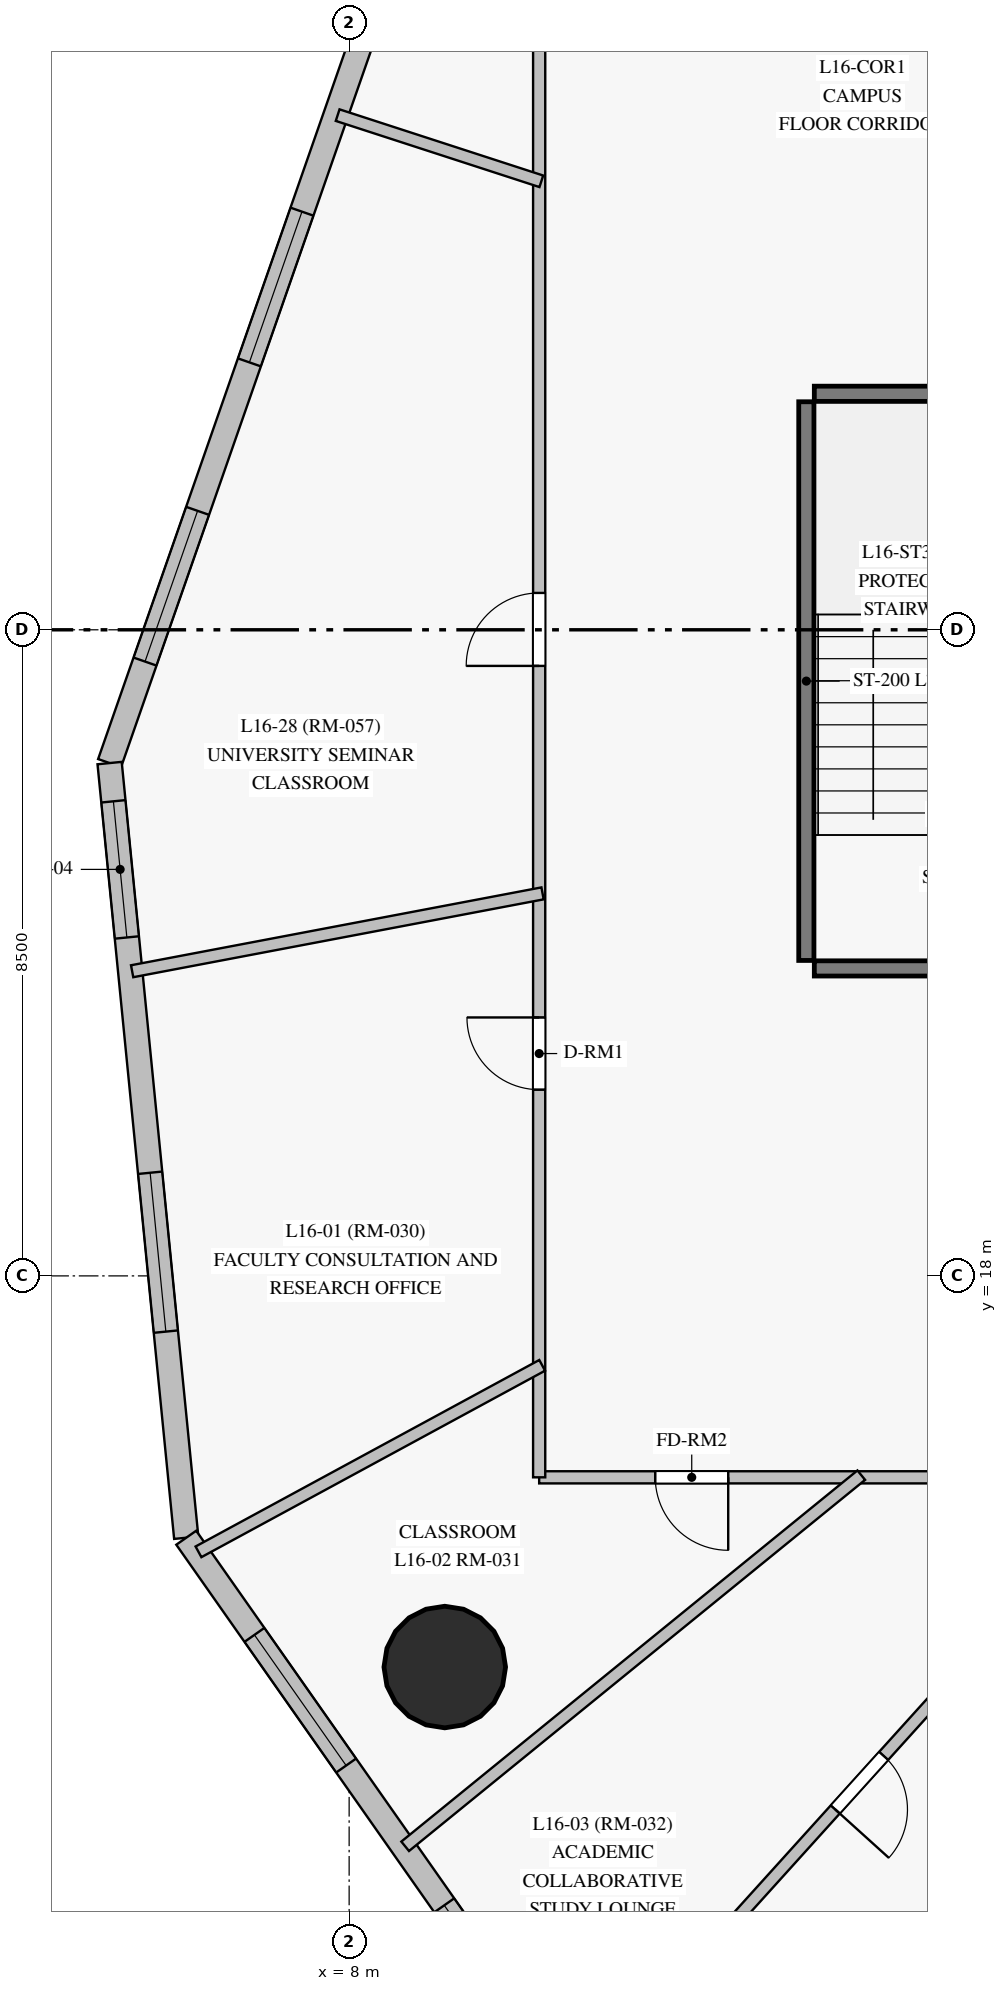
"""IFC4 building model, lengths in metres.
Left out: names, types, materials, properties, quantities, classifications, styles, units other than length and angle.
Written with IfcOpenShell. Run it as: python <this file> out.ifc"""

import sys

from ifc_helpers import new_model, si_unit, direction, frame, frame_2d, origin, origin_with_axes, origin_2d, place, context, subcontext, project, spatial, rectangle, circle, extrude, source, transform, mapped, element, fill, save


model = new_model("IFC4")
c1 = context("Model", 3, precision=1e-05, world=origin(), true_north=direction((0.0, 1.0)))
c2 = subcontext(c1, "Body", "Model", "MODEL_VIEW")
j1 = project(units=[si_unit("LENGTHUNIT", "METRE"), si_unit("PLANEANGLEUNIT", "RADIAN")], contexts=[c1])
p1 = place(None, origin())
s1 = spatial("IfcSite", under=j1, at=p1, CompositionType="ELEMENT")
p2 = place(p1, origin())
s2 = spatial("IfcBuilding", under=s1, at=p2, CompositionType="ELEMENT")
p3 = place(p2, frame((0.0, 0.0, 62.5)))
s3 = spatial("IfcBuildingStorey", under=s2, at=p3, CompositionType="ELEMENT", Elevation=62.5)
m1 = source(origin_with_axes(), c2, "Body", "SweptSolid", [
    extrude(circle(Radius=0.8, at=origin_2d()), origin(), (0.0, 0.0, 1.0), 3.6),
])
p4 = place(p3, frame((9.258, 12.854, 0.0), z_axis=(0.0, 0.0, 1.0), x_axis=(1.0, 0.0, 0.0)))
e1 = element("IfcColumn", 1, at=p4, inside=s3, PredefinedType="COLUMN", context=c2, shape_type="MappedRepresentation", body=[
    mapped(m1, transform((0.0, 0.0, 0.0), scale=1.0)),
])
p5 = place(p3, frame((9.744, 38.778, 0.0), z_axis=(0.0, 0.0, 1.0), x_axis=(-0.329395999257, -0.944191863804, 0.0)))
e2 = element("IfcWall", 2, at=p5, inside=s3, PredefinedType="SOLIDWALL", context=c2, shape_type="SweptSolid", body=[
    extrude(rectangle(XDim=14.861, YDim=0.32, at=frame_2d((7.43, 0.0))), origin(), (0.0, 0.0, 1.0), 3.35),
])
p6 = place(p5, frame((1.892, 0.0, 0.85)))
e3 = element("IfcOpeningElement", 3, at=p6, cuts=e2, PredefinedType="OPENING", context=c2, shape_type="SweptSolid", body=[
    extrude(rectangle(XDim=2.1, YDim=1.95, at=frame_2d((1.05, 0.975))), frame((0.0, 0.17, 0.0), z_axis=(0.0, -1.0, 0.0), x_axis=(1.0, 0.0, 0.0)), (0.0, 0.0, 1.0), 0.34),
])
p7 = place(p5, frame((7.177, 0.0, 0.85)))
e4 = element("IfcOpeningElement", 4, at=p7, cuts=e2, PredefinedType="OPENING", context=c2, shape_type="SweptSolid", body=[
    extrude(rectangle(XDim=2.1, YDim=1.95, at=frame_2d((1.05, 0.975))), frame((0.0, 0.17, 0.0), z_axis=(0.0, -1.0, 0.0), x_axis=(1.0, 0.0, 0.0)), (0.0, 0.0, 1.0), 0.34),
])
p8 = place(p5, frame((11.346, 0.0, 0.85)))
e5 = element("IfcOpeningElement", 5, at=p8, cuts=e2, PredefinedType="OPENING", context=c2, shape_type="SweptSolid", body=[
    extrude(rectangle(XDim=2.1, YDim=1.95, at=frame_2d((1.05, 0.975))), frame((0.0, 0.17, 0.0), z_axis=(0.0, -1.0, 0.0), x_axis=(1.0, 0.0, 0.0)), (0.0, 0.0, 1.0), 0.34),
])
p9 = place(p3, frame((4.849, 24.747, 0.0), z_axis=(0.0, 0.0, 1.0), x_axis=(0.098458021154, -0.995141205091, 0.0)))
e6 = element("IfcWall", 6, at=p9, inside=s3, PredefinedType="SOLIDWALL", context=c2, shape_type="SweptSolid", body=[
    extrude(rectangle(XDim=10.241, YDim=0.32, at=frame_2d((5.121, 0.0))), origin(), (0.0, 0.0, 1.0), 3.35),
])
p10 = place(p9, frame((0.506, 0.0, 0.85)))
e7 = element("IfcOpeningElement", 7, at=p10, cuts=e6, PredefinedType="OPENING", context=c2, shape_type="SweptSolid", body=[
    extrude(rectangle(XDim=1.8, YDim=1.85, at=frame_2d((0.9, 0.925))), frame((0.0, 0.17, 0.0), z_axis=(0.0, -1.0, 0.0), x_axis=(1.0, 0.0, 0.0)), (0.0, 0.0, 1.0), 0.34),
])
p11 = place(p9, frame((5.416, 0.0, 0.85)))
e8 = element("IfcOpeningElement", 8, at=p11, cuts=e6, PredefinedType="OPENING", context=c2, shape_type="SweptSolid", body=[
    extrude(rectangle(XDim=2.1, YDim=1.95, at=frame_2d((1.05, 0.975))), frame((0.0, 0.17, 0.0), z_axis=(0.0, -1.0, 0.0), x_axis=(1.0, 0.0, 0.0)), (0.0, 0.0, 1.0), 0.34),
])
p12 = place(p3, frame((5.857, 14.555, 0.0), z_axis=(0.0, 0.0, 1.0), x_axis=(0.574536666847, -0.818478844228, 0.0)))
e9 = element("IfcWall", 9, at=p12, inside=s3, PredefinedType="SOLIDWALL", context=c2, shape_type="SweptSolid", body=[
    extrude(rectangle(XDim=12.729, YDim=0.32, at=frame_2d((6.365, 0.0))), origin(), (0.0, 0.0, 1.0), 3.35),
])
p13 = place(p12, frame((1.562, 0.0, 0.85)))
e10 = element("IfcOpeningElement", 10, at=p13, cuts=e9, PredefinedType="OPENING", context=c2, shape_type="SweptSolid", body=[
    extrude(rectangle(XDim=2.1, YDim=1.95, at=frame_2d((1.05, 0.975))), frame((0.0, 0.17, 0.0), z_axis=(0.0, -1.0, 0.0), x_axis=(1.0, 0.0, 0.0)), (0.0, 0.0, 1.0), 0.34),
])
p14 = place(p12, frame((5.908, 0.0, 0.85)))
e11 = element("IfcOpeningElement", 11, at=p14, cuts=e9, PredefinedType="OPENING", context=c2, shape_type="SweptSolid", body=[
    extrude(rectangle(XDim=2.1, YDim=1.95, at=frame_2d((1.05, 0.975))), frame((0.0, 0.17, 0.0), z_axis=(0.0, -1.0, 0.0), x_axis=(1.0, 0.0, 0.0)), (0.0, 0.0, 1.0), 0.34),
])
p15 = place(p12, frame((9.756, 0.0, 0.85)))
e12 = element("IfcOpeningElement", 12, at=p15, cuts=e9, PredefinedType="OPENING", context=c2, shape_type="SweptSolid", body=[
    extrude(rectangle(XDim=2.1, YDim=1.95, at=frame_2d((1.05, 0.975))), frame((0.0, 0.17, 0.0), z_axis=(0.0, -1.0, 0.0), x_axis=(1.0, 0.0, 0.0)), (0.0, 0.0, 1.0), 0.34),
])
p16 = place(p3, frame((14.015, 22.15, 0.0), z_axis=(0.0, 0.0, 1.0), x_axis=(0.0, 1.0, 0.0)))
e13 = element("IfcWall", 13, at=p16, inside=s3, PredefinedType="SHEAR", context=c2, shape_type="SweptSolid", body=[
    extrude(rectangle(XDim=7.35, YDim=0.2, at=frame_2d((3.675, 0.0))), origin(), (0.0, 0.0, 1.0), 3.35),
])
for number, where, z_axis, x_axis in (
    (14, (14.12, 22.045, 0.0), (0.0, 0.0, 1.0), (1.0, 0.0, 0.0)),
    (15, (14.12, 29.605, 0.0), (0.0, 0.0, 1.0), (1.0, 0.0, 0.0)),
):
    element("IfcWall", number, at=place(p3, frame(where, z_axis=z_axis, x_axis=x_axis)), inside=s3, PredefinedType="SHEAR", context=c2, shape_type="SweptSolid", body=[
        extrude(rectangle(XDim=3.26, YDim=0.2, at=frame_2d((1.63, 0.0))), origin(), (0.0, 0.0, 1.0), 3.35),
    ])
p17 = place(p3, frame((40.25, 15.35, 0.0), z_axis=(0.0, 0.0, 1.0), x_axis=(-1.0, 0.0, 0.0)))
e16 = element("IfcWall", 16, at=p17, inside=s3, PredefinedType="PARTITIONING", context=c2, shape_type="SweptSolid", body=[
    extrude(rectangle(XDim=29.75, YDim=0.16, at=frame_2d((14.875, 0.0))), origin(), (0.0, 0.0, 1.0), 2.7),
])
p18 = place(p17, frame((27.263, 0.0, 0.0)))
e17 = element("IfcOpeningElement", 17, at=p18, cuts=e16, PredefinedType="OPENING", context=c2, shape_type="SweptSolid", body=[
    extrude(rectangle(XDim=0.96, YDim=2.15, at=frame_2d((0.48, 1.075))), frame((0.0, 0.09, 0.0), z_axis=(0.0, -1.0, 0.0), x_axis=(1.0, 0.0, 0.0)), (0.0, 0.0, 1.0), 0.18),
])
p19 = place(p17, frame((22.778, 0.0, 0.0)))
e18 = element("IfcOpeningElement", 18, at=p19, cuts=e16, PredefinedType="OPENING", context=c2, shape_type="SweptSolid", body=[
    extrude(rectangle(XDim=0.95, YDim=2.15, at=frame_2d((0.475, 1.075))), frame((0.0, 0.09, 0.0), z_axis=(0.0, -1.0, 0.0), x_axis=(1.0, 0.0, 0.0)), (0.0, 0.0, 1.0), 0.18),
])
p20 = place(p17, frame((14.4, 0.0, 0.0)))
e19 = element("IfcOpeningElement", 19, at=p20, cuts=e16, PredefinedType="OPENING", context=c2, shape_type="SweptSolid", body=[
    extrude(rectangle(XDim=0.96, YDim=2.15, at=frame_2d((0.48, 1.075))), frame((0.0, 0.09, 0.0), z_axis=(0.0, -1.0, 0.0), x_axis=(1.0, 0.0, 0.0)), (0.0, 0.0, 1.0), 0.18),
])
p21 = place(p17, frame((9.938, 0.0, 0.0)))
e20 = element("IfcOpeningElement", 20, at=p21, cuts=e16, PredefinedType="OPENING", context=c2, shape_type="SweptSolid", body=[
    extrude(rectangle(XDim=0.96, YDim=2.15, at=frame_2d((0.48, 1.075))), frame((0.0, 0.09, 0.0), z_axis=(0.0, -1.0, 0.0), x_axis=(1.0, 0.0, 0.0)), (0.0, 0.0, 1.0), 0.18),
])
p22 = place(p17, frame((2.033, 0.0, 0.0)))
e21 = element("IfcOpeningElement", 21, at=p22, cuts=e16, PredefinedType="OPENING", context=c2, shape_type="SweptSolid", body=[
    extrude(rectangle(XDim=0.95, YDim=2.15, at=frame_2d((0.475, 1.075))), frame((0.0, 0.09, 0.0), z_axis=(0.0, -1.0, 0.0), x_axis=(1.0, 0.0, 0.0)), (0.0, 0.0, 1.0), 0.18),
])
p23 = place(p3, frame((10.5, 15.35, 0.0), z_axis=(0.0, 0.0, 1.0), x_axis=(0.0, 1.0, 0.0)))
e22 = element("IfcWall", 22, at=p23, inside=s3, PredefinedType="PARTITIONING", context=c2, shape_type="SweptSolid", body=[
    extrude(rectangle(XDim=22.3, YDim=0.16, at=frame_2d((11.15, 0.0))), origin(), (0.0, 0.0, 1.0), 2.75),
])
p24 = place(p23, frame((5.1, 0.0, 0.0)))
e23 = element("IfcOpeningElement", 23, at=p24, cuts=e22, PredefinedType="OPENING", context=c2, shape_type="SweptSolid", body=[
    extrude(rectangle(XDim=0.95, YDim=2.15, at=frame_2d((0.475, 1.075))), frame((0.0, 0.09, 0.0), z_axis=(0.0, -1.0, 0.0), x_axis=(1.0, 0.0, 0.0)), (0.0, 0.0, 1.0), 0.18),
])
p25 = place(p23, frame((10.675, 0.0, 0.0)))
e24 = element("IfcOpeningElement", 24, at=p25, cuts=e22, PredefinedType="OPENING", context=c2, shape_type="SweptSolid", body=[
    extrude(rectangle(XDim=0.96, YDim=2.15, at=frame_2d((0.48, 1.075))), frame((0.0, 0.09, 0.0), z_axis=(0.0, -1.0, 0.0), x_axis=(1.0, 0.0, 0.0)), (0.0, 0.0, 1.0), 0.18),
])
p26 = place(p3, frame((18.374, 15.383, 0.0), z_axis=(0.0, 0.0, 1.0), x_axis=(-0.670442834564, -0.74196118873, 0.0)))
e25 = element("IfcWall", 25, at=p26, inside=s3, PredefinedType="PARTITIONING", context=c2, shape_type="SweptSolid", body=[
    extrude(rectangle(XDim=10.968, YDim=0.16, at=frame_2d((5.484, 0.0))), origin(), (0.0, 0.0, 1.0), 2.7),
])
p27 = place(p26, frame((4.984, 0.0, 0.0)))
e26 = element("IfcOpeningElement", 26, at=p27, cuts=e25, PredefinedType="OPENING", context=c2, shape_type="SweptSolid", body=[
    extrude(rectangle(XDim=0.95, YDim=2.15, at=frame_2d((0.475, 1.075))), frame((0.0, 0.09, 0.0), z_axis=(0.0, -1.0, 0.0), x_axis=(1.0, 0.0, 0.0)), (0.0, 0.0, 1.0), 0.18),
])
p28 = place(p3, frame((14.738, 15.378, 0.0), z_axis=(0.0, 0.0, 1.0), x_axis=(-0.775632067895, -0.631185309757, 0.0)))
e27 = element("IfcWall", 27, at=p28, inside=s3, PredefinedType="PARTITIONING", context=c2, shape_type="SweptSolid", body=[
    extrude(rectangle(XDim=7.736, YDim=0.16, at=frame_2d((3.868, 0.0))), origin(), (0.0, 0.0, 1.0), 2.7),
])
p29 = place(p3, frame((5.145, 22.008, 0.0), z_axis=(0.0, 0.0, 1.0), x_axis=(0.982481756529, 0.186358788598, 0.0)))
e28 = element("IfcWall", 28, at=p29, inside=s3, PredefinedType="PARTITIONING", context=c2, shape_type="SweptSolid", body=[
    extrude(rectangle(XDim=5.496, YDim=0.16, at=frame_2d((2.748, 0.0))), origin(), (0.0, 0.0, 1.0), 3.35),
])
p30 = place(p3, frame((10.54, 16.823, 0.0), z_axis=(0.0, 0.0, 1.0), x_axis=(-0.878958020236, -0.476899149363, 0.0)))
e29 = element("IfcWall", 29, at=p30, inside=s3, PredefinedType="PARTITIONING", context=c2, shape_type="SweptSolid", body=[
    extrude(rectangle(XDim=5.145, YDim=0.16, at=frame_2d((2.572, 0.0))), origin(), (0.0, 0.0, 1.0), 3.35),
])
p31 = place(p3, frame((10.529, 32.4, 0.0), z_axis=(0.0, 0.0, 1.0), x_axis=(-0.951090090214, 0.308913645373, 0.0)))
e30 = element("IfcWall", 30, at=p31, inside=s3, PredefinedType="PARTITIONING", context=c2, shape_type="SweptSolid", body=[
    extrude(rectangle(XDim=2.817, YDim=0.16, at=frame_2d((1.409, 0.0))), origin(), (0.0, 0.0, 1.0), 3.35),
])
m2 = source(origin_with_axes(), c2, "Body", "SweptSolid", [
    extrude(rectangle(XDim=2.1, YDim=1.95, at=frame_2d((1.05, 0.975))), frame((0.0, 0.03, 0.0), z_axis=(0.0, -1.0, 0.0), x_axis=(1.0, 0.0, 0.0)), (0.0, 0.0, 1.0), 0.06),
])
p32 = place(p7, origin())
e31 = element("IfcWindow", 31, at=p32, inside=s3, PartitioningType="SINGLE_PANEL", PredefinedType="WINDOW", context=c2, shape_type="MappedRepresentation", body=[
    mapped(m2, transform((0.0, 0.0, 0.0), scale=1.0)),
])
fill(e4, e31)
p33 = place(p8, origin())
e32 = element("IfcWindow", 32, at=p33, inside=s3, PartitioningType="SINGLE_PANEL", PredefinedType="WINDOW", context=c2, shape_type="MappedRepresentation", body=[
    mapped(m2, transform((0.0, 0.0, 0.0), scale=1.0)),
])
fill(e5, e32)
m3 = source(origin_with_axes(), c2, "Body", "SweptSolid", [
    extrude(rectangle(XDim=1.8, YDim=1.85, at=frame_2d((0.9, 0.925))), frame((0.0, 0.03, 0.0), z_axis=(0.0, -1.0, 0.0), x_axis=(1.0, 0.0, 0.0)), (0.0, 0.0, 1.0), 0.06),
])
p34 = place(p10, origin())
e33 = element("IfcWindow", 33, at=p34, inside=s3, PartitioningType="SINGLE_PANEL", PredefinedType="WINDOW", context=c2, shape_type="MappedRepresentation", body=[
    mapped(m3, transform((0.0, 0.0, 0.0), scale=1.0)),
])
fill(e7, e33)
p35 = place(p11, origin())
e34 = element("IfcWindow", 34, at=p35, inside=s3, PartitioningType="SINGLE_PANEL", PredefinedType="WINDOW", context=c2, shape_type="MappedRepresentation", body=[
    mapped(m2, transform((0.0, 0.0, 0.0), scale=1.0)),
])
fill(e8, e34)
p36 = place(p13, origin())
e35 = element("IfcWindow", 35, at=p36, inside=s3, PartitioningType="SINGLE_PANEL", PredefinedType="WINDOW", context=c2, shape_type="MappedRepresentation", body=[
    mapped(m2, transform((0.0, 0.0, 0.0), scale=1.0)),
])
fill(e10, e35)
p37 = place(p14, origin())
e36 = element("IfcWindow", 36, at=p37, inside=s3, PartitioningType="SINGLE_PANEL", PredefinedType="WINDOW", context=c2, shape_type="MappedRepresentation", body=[
    mapped(m2, transform((0.0, 0.0, 0.0), scale=1.0)),
])
fill(e11, e36)
m4 = source(origin_with_axes(), c2, "Body", "SweptSolid", [
    extrude(rectangle(XDim=0.95, YDim=2.15, at=frame_2d((0.475, 1.075))), frame((0.0, 0.025, 0.0), z_axis=(0.0, -1.0, 0.0), x_axis=(1.0, 0.0, 0.0)), (0.0, 0.0, 1.0), 0.05),
])
p38 = place(p24, origin())
e37 = element("IfcDoor", 37, at=p38, inside=s3, OperationType="SINGLE_SWING_RIGHT", PredefinedType="DOOR", context=c2, shape_type="MappedRepresentation", body=[
    mapped(m4, transform((0.0, 0.0, 0.0), scale=1.0)),
])
fill(e23, e37)
m5 = source(origin_with_axes(), c2, "Body", "SweptSolid", [
    extrude(rectangle(XDim=0.96, YDim=2.15, at=frame_2d((0.48, 1.075))), frame((0.0, 0.025, 0.0), z_axis=(0.0, -1.0, 0.0), x_axis=(1.0, 0.0, 0.0)), (0.0, 0.0, 1.0), 0.05),
])
p39 = place(p18, origin())
e38 = element("IfcDoor", 38, at=p39, inside=s3, OperationType="SINGLE_SWING_LEFT", PredefinedType="DOOR", context=c2, shape_type="MappedRepresentation", body=[
    mapped(m5, transform((0.0, 0.0, 0.0), scale=1.0)),
])
fill(e17, e38)
p40 = place(p25, origin())
e39 = element("IfcDoor", 39, at=p40, inside=s3, OperationType="SINGLE_SWING_LEFT", PredefinedType="DOOR", context=c2, shape_type="MappedRepresentation", body=[
    mapped(m5, transform((0.0, 0.0, 0.0), scale=1.0)),
])
fill(e24, e39)
p41 = place(p27, origin())
e40 = element("IfcDoor", 40, at=p41, inside=s3, OperationType="SINGLE_SWING_RIGHT", PredefinedType="DOOR", context=c2, shape_type="MappedRepresentation", body=[
    mapped(m4, transform((0.0, 0.0, 0.0), scale=1.0)),
])
fill(e26, e40)
save(model, sys.argv[1])
